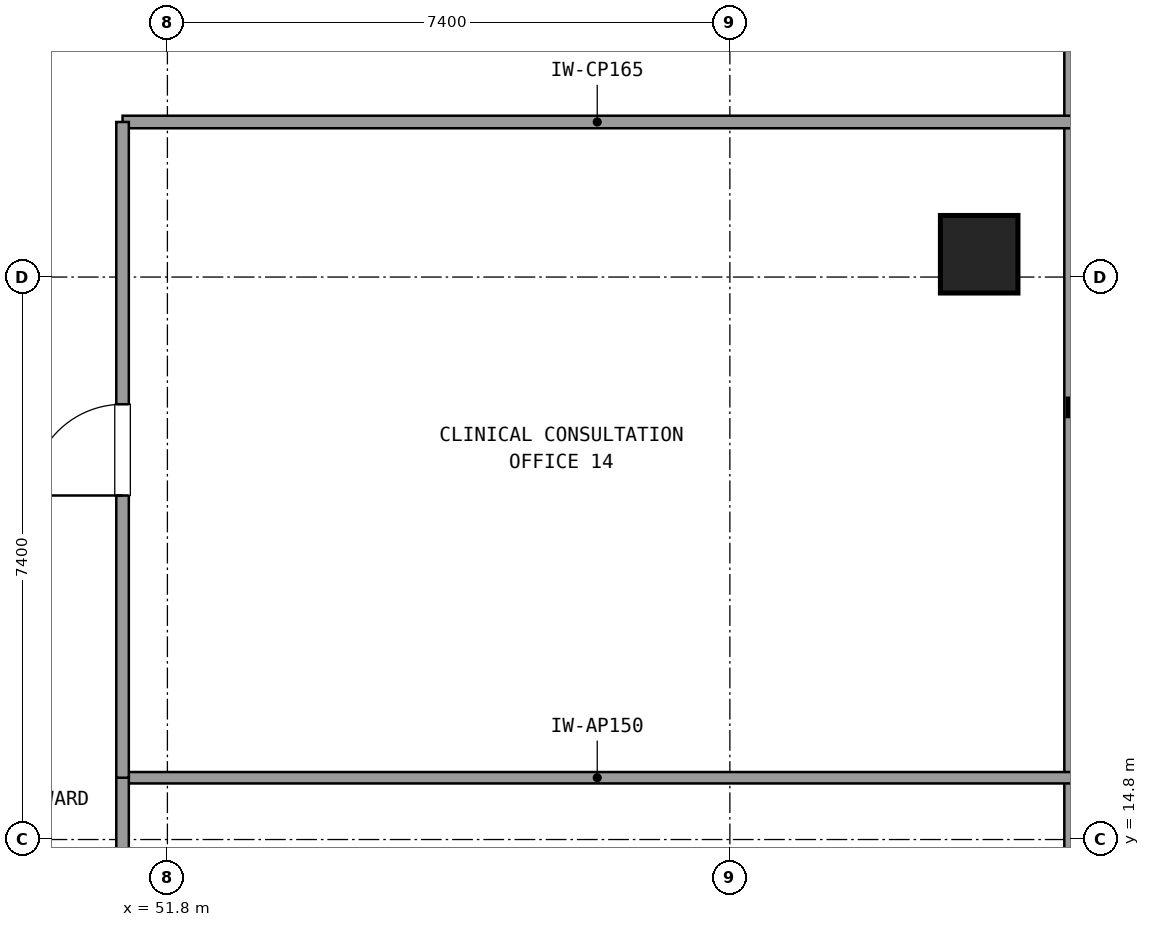
"""IFC4 building model, lengths in metres.
Left out: names, types, materials, properties, quantities, classifications, styles, units other than length and angle.
Written with IfcOpenShell. Run it as: python <this file> out.ifc"""

import sys

from ifc_helpers import new_model, si_unit, direction, frame, frame_2d, origin, origin_2d, place, context, subcontext, project, spatial, rectangle, extrude, element, fill, save


model = new_model("IFC4")
c1 = context("Model", 3, precision=1e-05, world=origin(), true_north=direction((0.0, 1.0)))
c2 = subcontext(c1, "Body", "Model", "MODEL_VIEW")
j1 = project(units=[si_unit("LENGTHUNIT", "METRE"), si_unit("PLANEANGLEUNIT", "RADIAN")], contexts=[c1])
p1 = place(None, origin())
s1 = spatial("IfcSite", under=j1, at=p1, CompositionType="ELEMENT")
p2 = place(p1, origin())
s2 = spatial("IfcBuilding", under=s1, at=p2, CompositionType="ELEMENT")
p3 = place(p2, frame((0.0, 0.0, 88.38)))
s3 = spatial("IfcBuildingStorey", under=s2, at=p3, CompositionType="ELEMENT", Elevation=88.38)
p4 = place(p3, frame((62.48, 22.5, 0.021), z_axis=(-0.084573087246, 0.0, 0.99641727851), x_axis=(0.0, -1.0, 0.0)))
e1 = element("IfcColumn", 1, at=p4, inside=s3, PredefinedType="COLUMN", context=c2, shape_type="SweptSolid", body=[
    extrude(rectangle(XDim=1.02, YDim=1.02, at=origin_2d()), origin(), (0.0, 0.0, 1.0), 3.571),
])
p5 = place(p3, frame((63.72, 9.655, 0.0), z_axis=(0.0, 0.0, 1.0), x_axis=(0.0, 1.0, 0.0)))
e2 = element("IfcWall", 2, at=p5, inside=s3, PredefinedType="SOLIDWALL", context=c2, shape_type="SweptSolid", body=[
    extrude(rectangle(XDim=32.49, YDim=0.24, at=frame_2d((16.245, 0.0))), origin(), (0.0, 0.0, 1.0), 0.85),
])
p6 = place(p3, frame((51.21, 24.24, 0.0), z_axis=(0.0, 0.0, 1.0), x_axis=(1.0, 0.0, 0.0)))
e3 = element("IfcWall", 3, at=p6, inside=s3, PredefinedType="PARTITIONING", context=c2, shape_type="SweptSolid", body=[
    extrude(rectangle(XDim=12.49, YDim=0.165, at=frame_2d((6.245, 0.0))), origin(), (0.0, 0.0, 1.0), 2.61),
])
p7 = place(p3, frame((51.21, 15.613, 0.0), z_axis=(0.0, 0.0, 1.0), x_axis=(1.0, 0.0, 0.0)))
e4 = element("IfcWall", 4, at=p7, inside=s3, PredefinedType="PARTITIONING", context=c2, shape_type="SweptSolid", body=[
    extrude(rectangle(XDim=12.49, YDim=0.15, at=frame_2d((6.245, 0.0))), origin(), (0.0, 0.0, 1.0), 2.61),
])
p8 = place(p3, frame((51.21, 3.7, 0.0), z_axis=(0.0, 0.0, 1.0), x_axis=(0.0, 1.0, 0.0)))
e5 = element("IfcWall", 5, at=p8, inside=s3, PredefinedType="PARTITIONING", context=c2, shape_type="SweptSolid", body=[
    extrude(rectangle(XDim=11.913, YDim=0.165, at=frame_2d((5.957, 0.0))), origin(), (0.0, 0.0, 1.0), 2.61),
])
p9 = place(p8, frame((5.357, 0.0, 0.0)))
e6 = element("IfcOpeningElement", 6, at=p9, cuts=e5, PredefinedType="OPENING", context=c2, shape_type="SweptSolid", body=[
    extrude(rectangle(XDim=1.2, YDim=2.15, at=frame_2d((0.6, 1.075))), frame((0.0, 0.093, 0.0), z_axis=(0.0, -1.0, 0.0), x_axis=(1.0, 0.0, 0.0)), (0.0, 0.0, 1.0), 0.185),
])
p10 = place(p3, frame((51.21, 15.613, 0.0), z_axis=(0.0, 0.0, 1.0), x_axis=(0.0, 1.0, 0.0)))
e7 = element("IfcWall", 7, at=p10, inside=s3, PredefinedType="PARTITIONING", context=c2, shape_type="SweptSolid", body=[
    extrude(rectangle(XDim=8.627, YDim=0.165, at=frame_2d((4.313, 0.0))), origin(), (0.0, 0.0, 1.0), 2.61),
])
p11 = place(p10, frame((3.713, 0.0, 0.0)))
e8 = element("IfcOpeningElement", 8, at=p11, cuts=e7, PredefinedType="OPENING", context=c2, shape_type="SweptSolid", body=[
    extrude(rectangle(XDim=1.2, YDim=2.15, at=frame_2d((0.6, 1.075))), frame((0.0, 0.093, 0.0), z_axis=(0.0, -1.0, 0.0), x_axis=(1.0, 0.0, 0.0)), (0.0, 0.0, 1.0), 0.185),
])
p12 = place(p11, origin())
e9 = element("IfcDoor", 9, at=p12, inside=s3, OperationType="SINGLE_SWING_LEFT", PredefinedType="DOOR", context=c2, shape_type="SweptSolid", body=[
    extrude(rectangle(XDim=1.2, YDim=2.15, at=frame_2d((0.6, 1.075))), frame((0.0, 0.025, 0.0), z_axis=(0.0, -1.0, 0.0), x_axis=(1.0, 0.0, 0.0)), (0.0, 0.0, 1.0), 0.05),
])
fill(e8, e9)
save(model, sys.argv[1])
